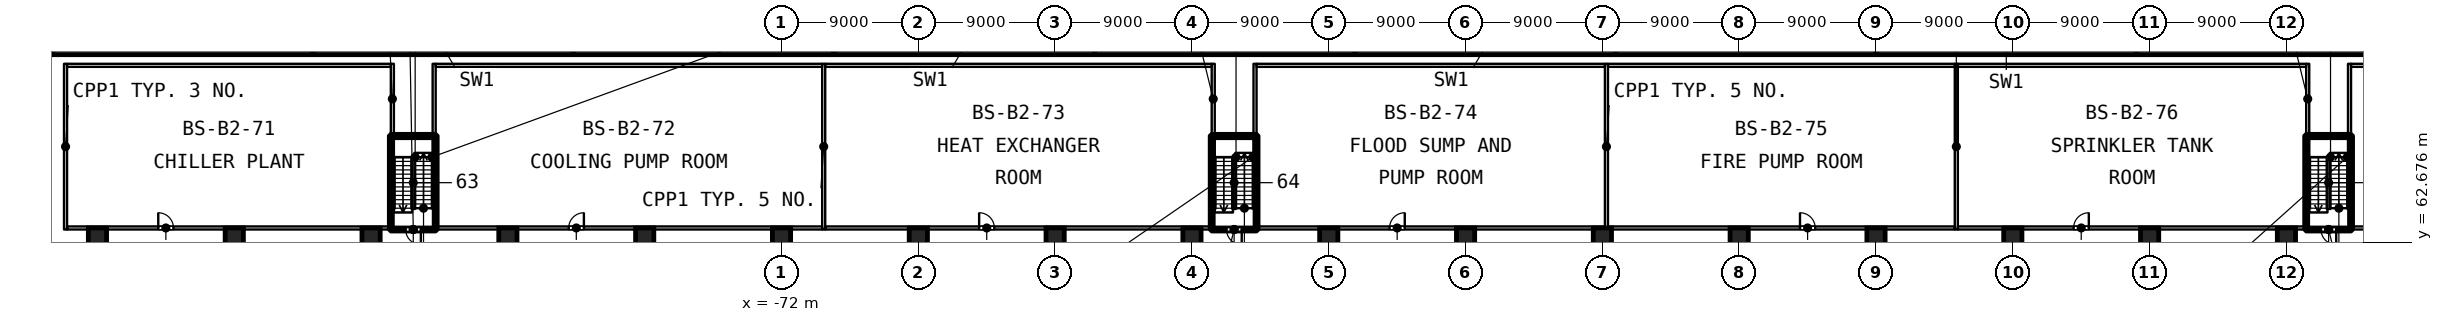
"""IFC4 building model, lengths in metres.
Left out: names, types, materials, properties, quantities, classifications, styles, units other than length and angle.
Written with IfcOpenShell. Run it as: python <this file> out.ifc"""

import sys

from ifc_helpers import new_model, si_unit, direction, frame, frame_2d, origin, origin_2d, place, context, subcontext, project, spatial, rectangle, extrude, element, fill, save


model = new_model("IFC4")
c1 = context("Model", 3, precision=1e-05, world=origin(), true_north=direction((0.0, 1.0)))
c2 = subcontext(c1, "Body", "Model", "MODEL_VIEW")
j1 = project(units=[si_unit("LENGTHUNIT", "METRE"), si_unit("PLANEANGLEUNIT", "RADIAN")], contexts=[c1])
p1 = place(None, origin())
s1 = spatial("IfcSite", under=j1, at=p1, CompositionType="ELEMENT")
p2 = place(p1, origin())
s2 = spatial("IfcBuilding", under=s1, at=p2, CompositionType="ELEMENT")
p3 = place(p2, frame((0.0, 0.0, -9.0)))
s3 = spatial("IfcBuildingStorey", under=s2, at=p3, CompositionType="ELEMENT", Elevation=-9.0)
p4 = place(p3, frame((-121.463, 75.354, 0.0), z_axis=(0.0, 0.0, 1.0), x_axis=(0.995184880112, 0.098015582414, 0.0)))
e1 = element("IfcWall", 1, at=p4, inside=s3, PredefinedType="SOLIDWALL", context=c2, shape_type="SweptSolid", body=[
    extrude(rectangle(XDim=1.494, YDim=1.0, at=frame_2d((0.747, 0.0))), origin(), (0.0, 0.0, 1.0), 4.5),
])
p5 = place(p3, frame((-119.975, 75.5, 0.0), z_axis=(0.0, 0.0, 1.0), x_axis=(1.0, 0.0, 0.0)))
e2 = element("IfcWall", 2, at=p5, inside=s3, PredefinedType="SOLIDWALL", context=c2, shape_type="SweptSolid", body=[
    extrude(rectangle(XDim=17.139, YDim=1.0, at=frame_2d((8.57, 0.0))), origin(), (0.0, 0.0, 1.0), 4.5),
])
for number, where, z_axis, x_axis in (
    (3, (-102.836, 75.5, 0.0), (0.0, 0.0, 1.0), (1.0, 0.0, 0.0)),
    (4, (-85.697, 75.5, 0.0), (0.0, 0.0, 1.0), (1.0, 0.0, 0.0)),
    (5, (-68.557, 75.5, 0.0), (0.0, 0.0, 1.0), (1.0, 0.0, 0.0)),
):
    element("IfcWall", number, at=place(p3, frame(where, z_axis=z_axis, x_axis=x_axis)), inside=s3, PredefinedType="SOLIDWALL", context=c2, shape_type="SweptSolid", body=[
        extrude(rectangle(XDim=17.139, YDim=1.0, at=frame_2d((8.57, 0.0))), origin(), (0.0, 0.0, 1.0), 4.5),
    ])
p6 = place(p3, frame((-51.418, 75.5, 0.0), z_axis=(0.0, 0.0, 1.0), x_axis=(1.0, 0.0, 0.0)))
e6 = element("IfcWall", 6, at=p6, inside=s3, PredefinedType="SOLIDWALL", context=c2, shape_type="SweptSolid", body=[
    extrude(rectangle(XDim=17.139, YDim=1.0, at=frame_2d((8.57, 0.0))), origin(), (0.0, 0.0, 1.0), 4.5),
])
for number, where, z_axis, x_axis in (
    (7, (-34.279, 75.5, 0.0), (0.0, 0.0, 1.0), (1.0, 0.0, 0.0)),
    (8, (-17.139, 75.5, 0.0), (0.0, 0.0, 1.0), (1.0, 0.0, 0.0)),
    (9, (0.0, 75.5, 0.0), (0.0, 0.0, 1.0), (1.0, 0.0, 0.0)),
    (10, (17.139, 75.5, 0.0), (0.0, 0.0, 1.0), (1.0, 0.0, 0.0)),
):
    element("IfcWall", number, at=place(p3, frame(where, z_axis=z_axis, x_axis=x_axis)), inside=s3, PredefinedType="SOLIDWALL", context=c2, shape_type="SweptSolid", body=[
        extrude(rectangle(XDim=17.139, YDim=1.0, at=frame_2d((8.57, 0.0))), origin(), (0.0, 0.0, 1.0), 4.5),
    ])
for number, where, z_axis, x_axis in (
    (11, (-117.0, 63.0, 0.0), (0.0, 0.0, 1.0), (1.0, 0.0, 0.0)),
    (12, (-108.0, 63.0, 0.0), (0.0, 0.0, 1.0), (1.0, 0.0, 0.0)),
    (13, (-99.0, 63.0, 0.0), (0.0, 0.0, 1.0), (1.0, 0.0, 0.0)),
    (14, (-90.0, 63.0, 0.0), (0.0, 0.0, 1.0), (1.0, 0.0, 0.0)),
    (15, (-81.0, 63.0, 0.0), (0.0, 0.0, 1.0), (1.0, 0.0, 0.0)),
    (16, (-72.0, 63.0, 0.0), (0.0, 0.0, 1.0), (1.0, 0.0, 0.0)),
    (17, (-63.0, 63.0, 0.0), (0.0, 0.0, 1.0), (1.0, 0.0, 0.0)),
    (18, (-54.0, 63.0, 0.0), (0.0, 0.0, 1.0), (1.0, 0.0, 0.0)),
    (19, (-45.0, 63.0, 0.0), (0.0, 0.0, 1.0), (1.0, 0.0, 0.0)),
    (20, (-36.0, 63.0, 0.0), (0.0, 0.0, 1.0), (1.0, 0.0, 0.0)),
    (21, (-27.0, 63.0, 0.0), (0.0, 0.0, 1.0), (1.0, 0.0, 0.0)),
    (22, (-18.0, 63.0, 0.0), (0.0, 0.0, 1.0), (1.0, 0.0, 0.0)),
    (23, (-9.0, 63.0, 0.0), (0.0, 0.0, 1.0), (1.0, 0.0, 0.0)),
    (24, (0.0, 63.0, 0.0), (0.0, 0.0, 1.0), (1.0, 0.0, 0.0)),
    (25, (9.0, 63.0, 0.0), (0.0, 0.0, 1.0), (1.0, 0.0, 0.0)),
    (26, (18.0, 63.0, 0.0), (0.0, 0.0, 1.0), (1.0, 0.0, 0.0)),
    (27, (27.0, 63.0, 0.0), (0.0, 0.0, 1.0), (1.0, 0.0, 0.0)),
):
    element("IfcColumn", number, at=place(p3, frame(where, z_axis=z_axis, x_axis=x_axis)), inside=s3, PredefinedType="COLUMN", context=c2, shape_type="SweptSolid", body=[
        extrude(rectangle(XDim=1.2, YDim=1.2, at=origin_2d()), origin(), (0.0, 0.0, 1.0), 4.5),
    ])
p7 = place(p3, frame((-119.1, 63.5, 0.0), z_axis=(0.0, 0.0, 1.0), x_axis=(0.0, 1.0, 0.0)))
e28 = element("IfcWall", 28, at=p7, inside=s3, PredefinedType="PARTITIONING", context=c2, shape_type="SweptSolid", body=[
    extrude(rectangle(XDim=10.9, YDim=0.2, at=frame_2d((5.45, 0.0))), origin(), (0.0, 0.0, 1.0), 4.1),
])
for number, where, z_axis, x_axis in (
    (29, (-97.6, 69.78, 0.0), (0.0, 0.0, 1.0), (0.0, 1.0, 0.0)),
    (30, (-94.85, 69.78, 0.0), (0.0, 0.0, 1.0), (0.0, 1.0, 0.0)),
):
    element("IfcWall", number, at=place(p3, frame(where, z_axis=z_axis, x_axis=x_axis)), inside=s3, PredefinedType="PARTITIONING", context=c2, shape_type="SweptSolid", body=[
        extrude(rectangle(XDim=4.62, YDim=0.2, at=frame_2d((2.31, 0.0))), origin(), (0.0, 0.0, 1.0), 4.1),
    ])
p8 = place(p3, frame((-69.225, 63.5, 0.0), z_axis=(0.0, 0.0, 1.0), x_axis=(0.0, 1.0, 0.0)))
e31 = element("IfcWall", 31, at=p8, inside=s3, PredefinedType="PARTITIONING", context=c2, shape_type="SweptSolid", body=[
    extrude(rectangle(XDim=10.9, YDim=0.2, at=frame_2d((5.45, 0.0))), origin(), (0.0, 0.0, 1.0), 4.1),
])
for number, where, z_axis, x_axis in (
    (32, (-43.6, 69.78, 0.0), (0.0, 0.0, 1.0), (0.0, 1.0, 0.0)),
    (33, (-40.85, 69.78, 0.0), (0.0, 0.0, 1.0), (0.0, 1.0, 0.0)),
):
    element("IfcWall", number, at=place(p3, frame(where, z_axis=z_axis, x_axis=x_axis)), inside=s3, PredefinedType="PARTITIONING", context=c2, shape_type="SweptSolid", body=[
        extrude(rectangle(XDim=4.62, YDim=0.2, at=frame_2d((2.31, 0.0))), origin(), (0.0, 0.0, 1.0), 4.1),
    ])
for number, where, z_axis, x_axis in (
    (34, (-17.733, 63.5, 0.0), (0.0, 0.0, 1.0), (0.0, 1.0, 0.0)),
    (35, (5.283, 63.5, 0.0), (0.0, 0.0, 1.0), (0.0, 1.0, 0.0)),
):
    element("IfcWall", number, at=place(p3, frame(where, z_axis=z_axis, x_axis=x_axis)), inside=s3, PredefinedType="PARTITIONING", context=c2, shape_type="SweptSolid", body=[
        extrude(rectangle(XDim=10.9, YDim=0.2, at=frame_2d((5.45, 0.0))), origin(), (0.0, 0.0, 1.0), 4.1),
    ])
for number, where, z_axis, x_axis in (
    (36, (28.4, 69.78, 0.0), (0.0, 0.0, 1.0), (0.0, 1.0, 0.0)),
    (37, (31.15, 69.78, 0.0), (0.0, 0.0, 1.0), (0.0, 1.0, 0.0)),
):
    element("IfcWall", number, at=place(p3, frame(where, z_axis=z_axis, x_axis=x_axis)), inside=s3, PredefinedType="PARTITIONING", context=c2, shape_type="SweptSolid", body=[
        extrude(rectangle(XDim=4.62, YDim=0.2, at=frame_2d((2.31, 0.0))), origin(), (0.0, 0.0, 1.0), 4.1),
    ])
p9 = place(p3, frame((-119.0, 63.6, 0.0), z_axis=(0.0, 0.0, 1.0), x_axis=(1.0, 0.0, 0.0)))
e38 = element("IfcWall", 38, at=p9, inside=s3, PredefinedType="PARTITIONING", context=c2, shape_type="SweptSolid", body=[
    extrude(rectangle(XDim=21.18, YDim=0.2, at=frame_2d((10.59, 0.0))), origin(), (0.0, 0.0, 1.0), 4.1),
])
p10 = place(p9, frame((6.0, 0.0, 0.0)))
e39 = element("IfcOpeningElement", 39, at=p10, cuts=e38, PredefinedType="OPENING", context=c2, shape_type="SweptSolid", body=[
    extrude(rectangle(XDim=1.0, YDim=2.1, at=frame_2d((0.5, 1.05))), frame((0.0, 0.11, 0.0), z_axis=(0.0, -1.0, 0.0), x_axis=(1.0, 0.0, 0.0)), (0.0, 0.0, 1.0), 0.22),
])
p11 = place(p3, frame((-94.63, 63.6, 0.0), z_axis=(0.0, 0.0, 1.0), x_axis=(1.0, 0.0, 0.0)))
e40 = element("IfcWall", 40, at=p11, inside=s3, PredefinedType="PARTITIONING", context=c2, shape_type="SweptSolid", body=[
    extrude(rectangle(XDim=25.305, YDim=0.2, at=frame_2d((12.652, 0.0))), origin(), (0.0, 0.0, 1.0), 4.1),
])
p12 = place(p11, frame((8.63, 0.0, 0.0)))
e41 = element("IfcOpeningElement", 41, at=p12, cuts=e40, PredefinedType="OPENING", context=c2, shape_type="SweptSolid", body=[
    extrude(rectangle(XDim=1.0, YDim=2.1, at=frame_2d((0.5, 1.05))), frame((0.0, 0.11, 0.0), z_axis=(0.0, -1.0, 0.0), x_axis=(1.0, 0.0, 0.0)), (0.0, 0.0, 1.0), 0.22),
])
p13 = place(p3, frame((-69.125, 63.6, 0.0), z_axis=(0.0, 0.0, 1.0), x_axis=(1.0, 0.0, 0.0)))
e42 = element("IfcWall", 42, at=p13, inside=s3, PredefinedType="PARTITIONING", context=c2, shape_type="SweptSolid", body=[
    extrude(rectangle(XDim=25.305, YDim=0.2, at=frame_2d((12.652, 0.0))), origin(), (0.0, 0.0, 1.0), 4.1),
])
p14 = place(p13, frame((10.125, 0.0, 0.0)))
e43 = element("IfcOpeningElement", 43, at=p14, cuts=e42, PredefinedType="OPENING", context=c2, shape_type="SweptSolid", body=[
    extrude(rectangle(XDim=1.0, YDim=2.1, at=frame_2d((0.5, 1.05))), frame((0.0, 0.11, 0.0), z_axis=(0.0, -1.0, 0.0), x_axis=(1.0, 0.0, 0.0)), (0.0, 0.0, 1.0), 0.22),
])
p15 = place(p3, frame((-40.63, 63.6, 0.0), z_axis=(0.0, 0.0, 1.0), x_axis=(1.0, 0.0, 0.0)))
e44 = element("IfcWall", 44, at=p15, inside=s3, PredefinedType="PARTITIONING", context=c2, shape_type="SweptSolid", body=[
    extrude(rectangle(XDim=22.797, YDim=0.2, at=frame_2d((11.398, 0.0))), origin(), (0.0, 0.0, 1.0), 4.1),
])
p16 = place(p15, frame((8.63, 0.0, 0.0)))
e45 = element("IfcOpeningElement", 45, at=p16, cuts=e44, PredefinedType="OPENING", context=c2, shape_type="SweptSolid", body=[
    extrude(rectangle(XDim=1.0, YDim=2.1, at=frame_2d((0.5, 1.05))), frame((0.0, 0.11, 0.0), z_axis=(0.0, -1.0, 0.0), x_axis=(1.0, 0.0, 0.0)), (0.0, 0.0, 1.0), 0.22),
])
p17 = place(p3, frame((-17.633, 63.6, 0.0), z_axis=(0.0, 0.0, 1.0), x_axis=(1.0, 0.0, 0.0)))
e46 = element("IfcWall", 46, at=p17, inside=s3, PredefinedType="PARTITIONING", context=c2, shape_type="SweptSolid", body=[
    extrude(rectangle(XDim=22.816, YDim=0.2, at=frame_2d((11.408, 0.0))), origin(), (0.0, 0.0, 1.0), 4.1),
])
p18 = place(p17, frame((12.633, 0.0, 0.0)))
e47 = element("IfcOpeningElement", 47, at=p18, cuts=e46, PredefinedType="OPENING", context=c2, shape_type="SweptSolid", body=[
    extrude(rectangle(XDim=1.0, YDim=2.1, at=frame_2d((0.5, 1.05))), frame((0.0, 0.11, 0.0), z_axis=(0.0, -1.0, 0.0), x_axis=(1.0, 0.0, 0.0)), (0.0, 0.0, 1.0), 0.22),
])
p19 = place(p3, frame((5.383, 63.6, 0.0), z_axis=(0.0, 0.0, 1.0), x_axis=(1.0, 0.0, 0.0)))
e48 = element("IfcWall", 48, at=p19, inside=s3, PredefinedType="PARTITIONING", context=c2, shape_type="SweptSolid", body=[
    extrude(rectangle(XDim=22.797, YDim=0.2, at=frame_2d((11.398, 0.0))), origin(), (0.0, 0.0, 1.0), 4.1),
])
p20 = place(p19, frame((7.617, 0.0, 0.0)))
e49 = element("IfcOpeningElement", 49, at=p20, cuts=e48, PredefinedType="OPENING", context=c2, shape_type="SweptSolid", body=[
    extrude(rectangle(XDim=1.0, YDim=2.1, at=frame_2d((0.5, 1.05))), frame((0.0, 0.11, 0.0), z_axis=(0.0, -1.0, 0.0), x_axis=(1.0, 0.0, 0.0)), (0.0, 0.0, 1.0), 0.22),
])
p21 = place(p3, frame((31.37, 63.6, 0.0), z_axis=(0.0, 0.0, 1.0), x_axis=(1.0, 0.0, 0.0)))
e50 = element("IfcWall", 50, at=p21, inside=s3, PredefinedType="PARTITIONING", context=c2, shape_type="SweptSolid", body=[
    extrude(rectangle(XDim=29.805, YDim=0.2, at=frame_2d((14.902, 0.0))), origin(), (0.0, 0.0, 1.0), 4.1),
])
p22 = place(p21, frame((17.63, 0.0, 0.0)))
e51 = element("IfcOpeningElement", 51, at=p22, cuts=e50, PredefinedType="OPENING", context=c2, shape_type="SweptSolid", body=[
    extrude(rectangle(XDim=1.0, YDim=2.1, at=frame_2d((0.5, 1.05))), frame((0.0, 0.11, 0.0), z_axis=(0.0, -1.0, 0.0), x_axis=(1.0, 0.0, 0.0)), (0.0, 0.0, 1.0), 0.22),
])
p23 = place(p3, frame((-119.0, 74.3, 0.0), z_axis=(0.0, 0.0, 1.0), x_axis=(1.0, 0.0, 0.0)))
e52 = element("IfcWall", 52, at=p23, inside=s3, PredefinedType="PARTITIONING", context=c2, shape_type="SweptSolid", body=[
    extrude(rectangle(XDim=21.3, YDim=0.2, at=frame_2d((10.65, 0.0))), origin(), (0.0, 0.0, 1.0), 4.1),
])
for number, where, z_axis, x_axis in (
    (53, (-94.75, 74.3, 0.0), (0.0, 0.0, 1.0), (1.0, 0.0, 0.0)),
    (54, (-69.125, 74.3, 0.0), (0.0, 0.0, 1.0), (1.0, 0.0, 0.0)),
):
    element("IfcWall", number, at=place(p3, frame(where, z_axis=z_axis, x_axis=x_axis)), inside=s3, PredefinedType="PARTITIONING", context=c2, shape_type="SweptSolid", body=[
        extrude(rectangle(XDim=25.425, YDim=0.2, at=frame_2d((12.712, 0.0))), origin(), (0.0, 0.0, 1.0), 4.1),
    ])
p24 = place(p3, frame((-40.75, 74.3, 0.0), z_axis=(0.0, 0.0, 1.0), x_axis=(1.0, 0.0, 0.0)))
e55 = element("IfcWall", 55, at=p24, inside=s3, PredefinedType="PARTITIONING", context=c2, shape_type="SweptSolid", body=[
    extrude(rectangle(XDim=22.917, YDim=0.2, at=frame_2d((11.458, 0.0))), origin(), (0.0, 0.0, 1.0), 4.1),
])
p25 = place(p3, frame((-17.633, 74.3, 0.0), z_axis=(0.0, 0.0, 1.0), x_axis=(1.0, 0.0, 0.0)))
e56 = element("IfcWall", 56, at=p25, inside=s3, PredefinedType="PARTITIONING", context=c2, shape_type="SweptSolid", body=[
    extrude(rectangle(XDim=22.816, YDim=0.2, at=frame_2d((11.408, 0.0))), origin(), (0.0, 0.0, 1.0), 4.1),
])
p26 = place(p3, frame((5.383, 74.3, 0.0), z_axis=(0.0, 0.0, 1.0), x_axis=(1.0, 0.0, 0.0)))
e57 = element("IfcWall", 57, at=p26, inside=s3, PredefinedType="PARTITIONING", context=c2, shape_type="SweptSolid", body=[
    extrude(rectangle(XDim=22.917, YDim=0.2, at=frame_2d((11.458, 0.0))), origin(), (0.0, 0.0, 1.0), 4.1),
])
p27 = place(p3, frame((31.25, 74.3, 0.0), z_axis=(0.0, 0.0, 1.0), x_axis=(1.0, 0.0, 0.0)))
e58 = element("IfcWall", 58, at=p27, inside=s3, PredefinedType="PARTITIONING", context=c2, shape_type="SweptSolid", body=[
    extrude(rectangle(XDim=29.925, YDim=0.2, at=frame_2d((14.962, 0.0))), origin(), (0.0, 0.0, 1.0), 4.1),
])
p28 = place(p3, frame((-94.75, 63.5, 0.0), z_axis=(0.0, 0.0, 1.0), x_axis=(-1.0, 0.0, 0.0)))
e59 = element("IfcWall", 59, at=p28, inside=s3, PredefinedType="SOLIDWALL", context=c2, shape_type="SweptSolid", body=[
    extrude(rectangle(XDim=2.95, YDim=0.2, at=frame_2d((1.475, 0.0))), origin(), (0.0, 0.0, 1.0), 4.1),
])
p29 = place(p28, frame((0.975, 0.0, 0.0)))
e60 = element("IfcOpeningElement", 60, at=p29, cuts=e59, PredefinedType="OPENING", context=c2, shape_type="SweptSolid", body=[
    extrude(rectangle(XDim=1.0, YDim=2.1, at=frame_2d((0.5, 1.05))), frame((0.0, 0.11, 0.0), z_axis=(0.0, -1.0, 0.0), x_axis=(1.0, 0.0, 0.0)), (0.0, 0.0, 1.0), 0.22),
])
p30 = place(p3, frame((-97.7, 63.5, 0.0), z_axis=(0.0, 0.0, 1.0), x_axis=(0.0, 1.0, 0.0)))
e61 = element("IfcWall", 61, at=p30, inside=s3, PredefinedType="SOLIDWALL", context=c2, shape_type="SweptSolid", body=[
    extrude(rectangle(XDim=6.16, YDim=0.2, at=frame_2d((3.08, 0.0))), origin(), (0.0, 0.0, 1.0), 4.1),
])
p31 = place(p3, frame((-97.7, 69.66, 0.0), z_axis=(0.0, 0.0, 1.0), x_axis=(1.0, 0.0, 0.0)))
e62 = element("IfcWall", 62, at=p31, inside=s3, PredefinedType="SOLIDWALL", context=c2, shape_type="SweptSolid", body=[
    extrude(rectangle(XDim=2.95, YDim=0.2, at=frame_2d((1.475, 0.0))), origin(), (0.0, 0.0, 1.0), 4.1),
])
p32 = place(p3, frame((-94.75, 69.66, 0.0), z_axis=(0.0, 0.0, 1.0), x_axis=(0.0, -1.0, 0.0)))
e63 = element("IfcWall", 63, at=p32, inside=s3, PredefinedType="SOLIDWALL", context=c2, shape_type="SweptSolid", body=[
    extrude(rectangle(XDim=6.16, YDim=0.2, at=frame_2d((3.08, 0.0))), origin(), (0.0, 0.0, 1.0), 4.1),
])
p33 = place(p3, frame((-40.75, 63.5, 0.0), z_axis=(0.0, 0.0, 1.0), x_axis=(-1.0, 0.0, 0.0)))
e64 = element("IfcWall", 64, at=p33, inside=s3, PredefinedType="SOLIDWALL", context=c2, shape_type="SweptSolid", body=[
    extrude(rectangle(XDim=2.95, YDim=0.2, at=frame_2d((1.475, 0.0))), origin(), (0.0, 0.0, 1.0), 4.1),
])
p34 = place(p33, frame((0.975, 0.0, 0.0)))
e65 = element("IfcOpeningElement", 65, at=p34, cuts=e64, PredefinedType="OPENING", context=c2, shape_type="SweptSolid", body=[
    extrude(rectangle(XDim=1.0, YDim=2.1, at=frame_2d((0.5, 1.05))), frame((0.0, 0.11, 0.0), z_axis=(0.0, -1.0, 0.0), x_axis=(1.0, 0.0, 0.0)), (0.0, 0.0, 1.0), 0.22),
])
p35 = place(p3, frame((-43.7, 63.5, 0.0), z_axis=(0.0, 0.0, 1.0), x_axis=(0.0, 1.0, 0.0)))
e66 = element("IfcWall", 66, at=p35, inside=s3, PredefinedType="SOLIDWALL", context=c2, shape_type="SweptSolid", body=[
    extrude(rectangle(XDim=6.16, YDim=0.2, at=frame_2d((3.08, 0.0))), origin(), (0.0, 0.0, 1.0), 4.1),
])
p36 = place(p3, frame((-43.7, 69.66, 0.0), z_axis=(0.0, 0.0, 1.0), x_axis=(1.0, 0.0, 0.0)))
e67 = element("IfcWall", 67, at=p36, inside=s3, PredefinedType="SOLIDWALL", context=c2, shape_type="SweptSolid", body=[
    extrude(rectangle(XDim=2.95, YDim=0.2, at=frame_2d((1.475, 0.0))), origin(), (0.0, 0.0, 1.0), 4.1),
])
p37 = place(p3, frame((-40.75, 69.66, 0.0), z_axis=(0.0, 0.0, 1.0), x_axis=(0.0, -1.0, 0.0)))
e68 = element("IfcWall", 68, at=p37, inside=s3, PredefinedType="SOLIDWALL", context=c2, shape_type="SweptSolid", body=[
    extrude(rectangle(XDim=6.16, YDim=0.2, at=frame_2d((3.08, 0.0))), origin(), (0.0, 0.0, 1.0), 4.1),
])
p38 = place(p3, frame((31.25, 63.5, 0.0), z_axis=(0.0, 0.0, 1.0), x_axis=(-1.0, 0.0, 0.0)))
e69 = element("IfcWall", 69, at=p38, inside=s3, PredefinedType="SOLIDWALL", context=c2, shape_type="SweptSolid", body=[
    extrude(rectangle(XDim=2.95, YDim=0.2, at=frame_2d((1.475, 0.0))), origin(), (0.0, 0.0, 1.0), 4.1),
])
p39 = place(p38, frame((0.975, 0.0, 0.0)))
e70 = element("IfcOpeningElement", 70, at=p39, cuts=e69, PredefinedType="OPENING", context=c2, shape_type="SweptSolid", body=[
    extrude(rectangle(XDim=1.0, YDim=2.1, at=frame_2d((0.5, 1.05))), frame((0.0, 0.11, 0.0), z_axis=(0.0, -1.0, 0.0), x_axis=(1.0, 0.0, 0.0)), (0.0, 0.0, 1.0), 0.22),
])
p40 = place(p3, frame((28.3, 63.5, 0.0), z_axis=(0.0, 0.0, 1.0), x_axis=(0.0, 1.0, 0.0)))
e71 = element("IfcWall", 71, at=p40, inside=s3, PredefinedType="SOLIDWALL", context=c2, shape_type="SweptSolid", body=[
    extrude(rectangle(XDim=6.16, YDim=0.2, at=frame_2d((3.08, 0.0))), origin(), (0.0, 0.0, 1.0), 4.1),
])
p41 = place(p3, frame((28.3, 69.66, 0.0), z_axis=(0.0, 0.0, 1.0), x_axis=(1.0, 0.0, 0.0)))
e72 = element("IfcWall", 72, at=p41, inside=s3, PredefinedType="SOLIDWALL", context=c2, shape_type="SweptSolid", body=[
    extrude(rectangle(XDim=2.95, YDim=0.2, at=frame_2d((1.475, 0.0))), origin(), (0.0, 0.0, 1.0), 4.1),
])
p42 = place(p3, frame((31.25, 69.66, 0.0), z_axis=(0.0, 0.0, 1.0), x_axis=(0.0, -1.0, 0.0)))
e73 = element("IfcWall", 73, at=p42, inside=s3, PredefinedType="SOLIDWALL", context=c2, shape_type="SweptSolid", body=[
    extrude(rectangle(XDim=6.16, YDim=0.2, at=frame_2d((3.08, 0.0))), origin(), (0.0, 0.0, 1.0), 4.1),
])
p43 = place(p10, origin())
e74 = element("IfcDoor", 74, at=p43, inside=s3, OperationType="SINGLE_SWING_LEFT", PredefinedType="DOOR", context=c2, shape_type="SweptSolid", body=[
    extrude(rectangle(XDim=1.0, YDim=2.1, at=frame_2d((0.5, 1.05))), frame((0.0, 0.025, 0.0), z_axis=(0.0, -1.0, 0.0), x_axis=(1.0, 0.0, 0.0)), (0.0, 0.0, 1.0), 0.05),
])
fill(e39, e74)
p44 = place(p12, origin())
e75 = element("IfcDoor", 75, at=p44, inside=s3, OperationType="SINGLE_SWING_RIGHT", PredefinedType="DOOR", context=c2, shape_type="SweptSolid", body=[
    extrude(rectangle(XDim=1.0, YDim=2.1, at=frame_2d((0.5, 1.05))), frame((0.0, 0.025, 0.0), z_axis=(0.0, -1.0, 0.0), x_axis=(1.0, 0.0, 0.0)), (0.0, 0.0, 1.0), 0.05),
])
fill(e41, e75)
p45 = place(p14, origin())
e76 = element("IfcDoor", 76, at=p45, inside=s3, OperationType="SINGLE_SWING_LEFT", PredefinedType="DOOR", context=c2, shape_type="SweptSolid", body=[
    extrude(rectangle(XDim=1.0, YDim=2.1, at=frame_2d((0.5, 1.05))), frame((0.0, 0.025, 0.0), z_axis=(0.0, -1.0, 0.0), x_axis=(1.0, 0.0, 0.0)), (0.0, 0.0, 1.0), 0.05),
])
fill(e43, e76)
p46 = place(p16, origin())
e77 = element("IfcDoor", 77, at=p46, inside=s3, OperationType="SINGLE_SWING_RIGHT", PredefinedType="DOOR", context=c2, shape_type="SweptSolid", body=[
    extrude(rectangle(XDim=1.0, YDim=2.1, at=frame_2d((0.5, 1.05))), frame((0.0, 0.025, 0.0), z_axis=(0.0, -1.0, 0.0), x_axis=(1.0, 0.0, 0.0)), (0.0, 0.0, 1.0), 0.05),
])
fill(e45, e77)
p47 = place(p18, origin())
e78 = element("IfcDoor", 78, at=p47, inside=s3, OperationType="SINGLE_SWING_LEFT", PredefinedType="DOOR", context=c2, shape_type="SweptSolid", body=[
    extrude(rectangle(XDim=1.0, YDim=2.1, at=frame_2d((0.5, 1.05))), frame((0.0, 0.025, 0.0), z_axis=(0.0, -1.0, 0.0), x_axis=(1.0, 0.0, 0.0)), (0.0, 0.0, 1.0), 0.05),
])
fill(e47, e78)
p48 = place(p20, origin())
e79 = element("IfcDoor", 79, at=p48, inside=s3, OperationType="SINGLE_SWING_RIGHT", PredefinedType="DOOR", context=c2, shape_type="SweptSolid", body=[
    extrude(rectangle(XDim=1.0, YDim=2.1, at=frame_2d((0.5, 1.05))), frame((0.0, 0.025, 0.0), z_axis=(0.0, -1.0, 0.0), x_axis=(1.0, 0.0, 0.0)), (0.0, 0.0, 1.0), 0.05),
])
fill(e49, e79)
p49 = place(p29, origin())
e80 = element("IfcDoor", 80, at=p49, inside=s3, OperationType="SINGLE_SWING_LEFT", PredefinedType="DOOR", context=c2, shape_type="SweptSolid", body=[
    extrude(rectangle(XDim=1.0, YDim=2.1, at=frame_2d((0.5, 1.05))), frame((0.0, 0.025, 0.0), z_axis=(0.0, -1.0, 0.0), x_axis=(1.0, 0.0, 0.0)), (0.0, 0.0, 1.0), 0.05),
])
fill(e60, e80)
p50 = place(p34, origin())
e81 = element("IfcDoor", 81, at=p50, inside=s3, OperationType="SINGLE_SWING_LEFT", PredefinedType="DOOR", context=c2, shape_type="SweptSolid", body=[
    extrude(rectangle(XDim=1.0, YDim=2.1, at=frame_2d((0.5, 1.05))), frame((0.0, 0.025, 0.0), z_axis=(0.0, -1.0, 0.0), x_axis=(1.0, 0.0, 0.0)), (0.0, 0.0, 1.0), 0.05),
])
fill(e65, e81)
p51 = place(p39, origin())
e82 = element("IfcDoor", 82, at=p51, inside=s3, OperationType="SINGLE_SWING_LEFT", PredefinedType="DOOR", context=c2, shape_type="SweptSolid", body=[
    extrude(rectangle(XDim=1.0, YDim=2.1, at=frame_2d((0.5, 1.05))), frame((0.0, 0.025, 0.0), z_axis=(0.0, -1.0, 0.0), x_axis=(1.0, 0.0, 0.0)), (0.0, 0.0, 1.0), 0.05),
])
fill(e70, e82)
save(model, sys.argv[1])
